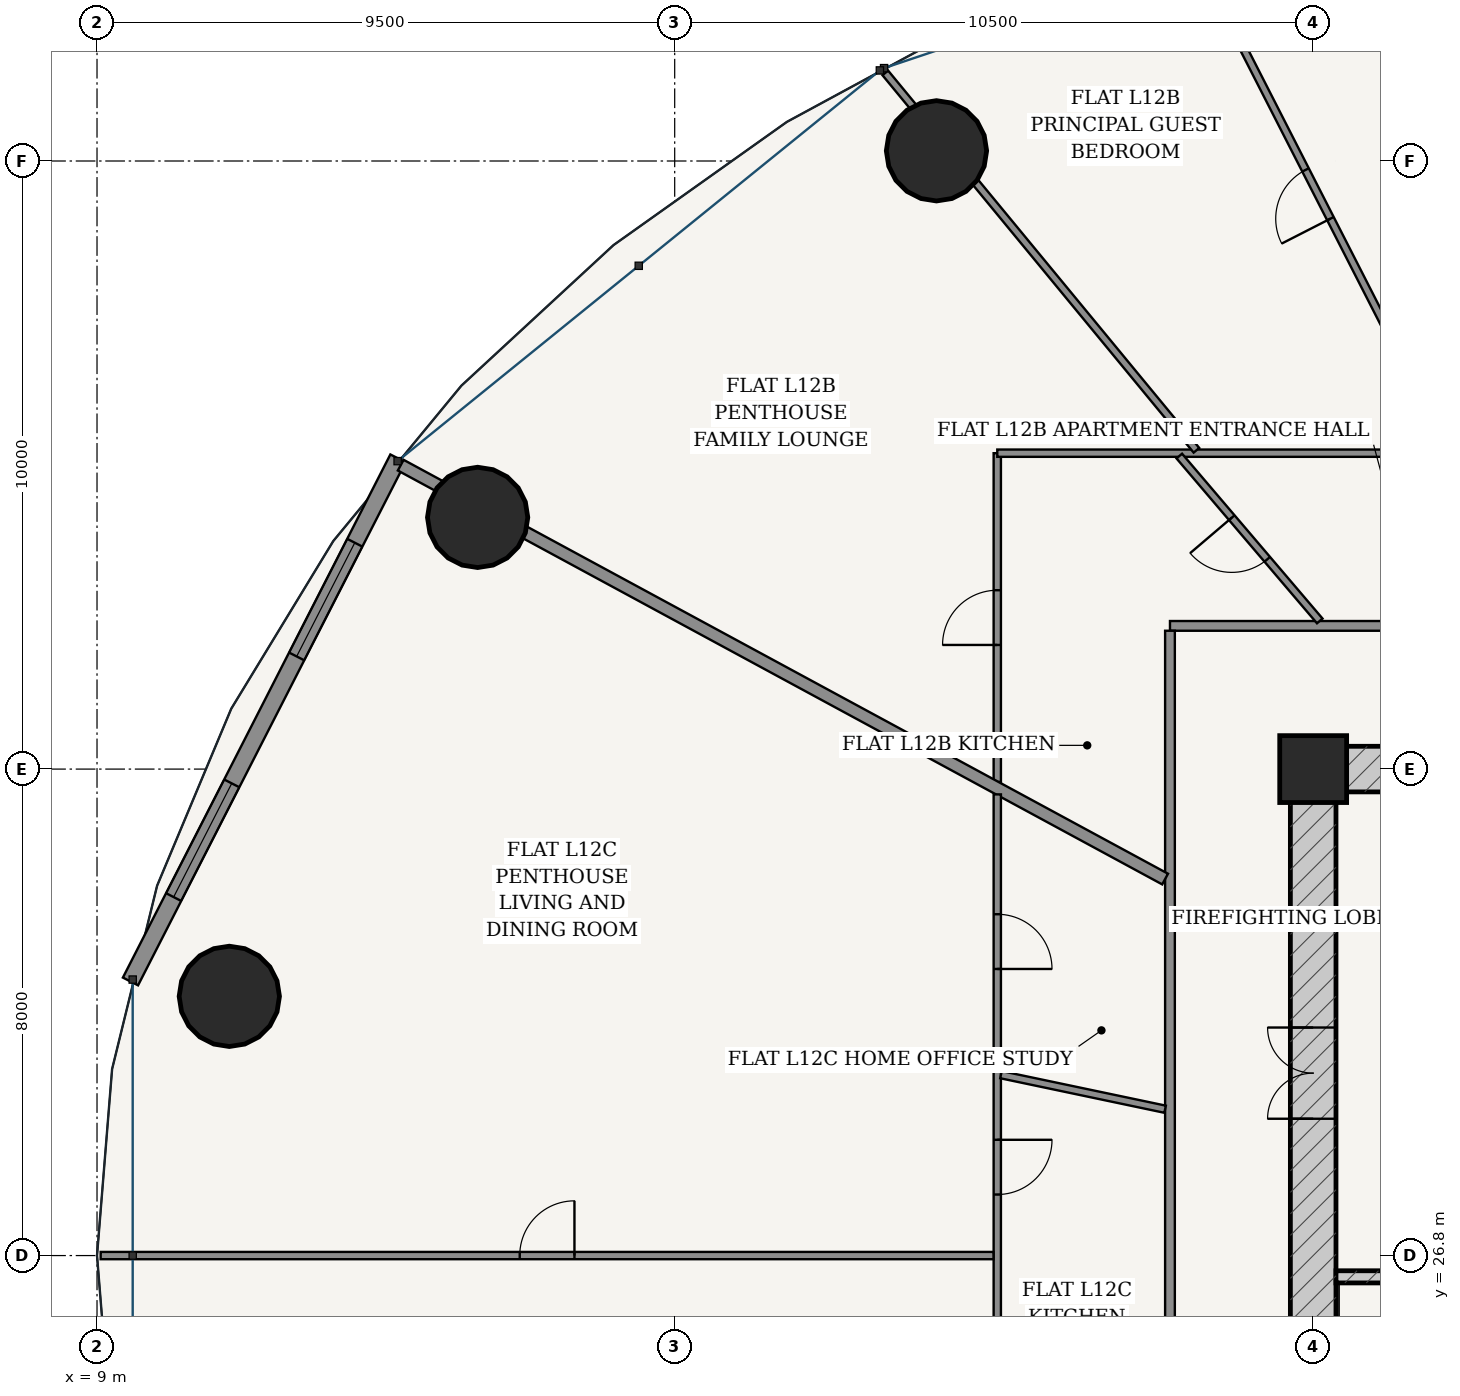
"""IFC4 building model, lengths in metres.
Left out: names, types, materials, properties, quantities, classifications, styles, units other than length and angle.
Written with IfcOpenShell. Run it as: python <this file> out.ifc"""

import sys

from ifc_helpers import new_model, si_unit, direction, frame, frame_2d, origin, origin_2d, place, context, subcontext, project, spatial, rectangle, hollow_circle, extrude, source, transform, mapped, element, fill, save


model = new_model("IFC4")
c1 = context("Model", 3, precision=1e-05, world=origin(), true_north=direction((-0.2419218956, 0.970295726276)))
c2 = subcontext(c1, "Body", "Model", "MODEL_VIEW")
j1 = project(units=[si_unit("LENGTHUNIT", "METRE"), si_unit("PLANEANGLEUNIT", "RADIAN")], contexts=[c1])
p1 = place(None, origin())
s1 = spatial("IfcSite", under=j1, at=p1, CompositionType="ELEMENT")
p2 = place(p1, origin())
s2 = spatial("IfcBuilding", under=s1, at=p2, CompositionType="ELEMENT")
p3 = place(p2, frame((0.0, 0.0, 49.2)))
s3 = spatial("IfcBuildingStorey", under=s2, at=p3, CompositionType="ELEMENT", Elevation=49.2)
p4 = place(p3, frame((29.0, 34.8, 0.0), z_axis=(0.0, 0.0, 1.0), x_axis=(1.0, 0.0, 0.0)))
e1 = element("IfcColumn", 1, at=p4, inside=s3, PredefinedType="COLUMN", context=c2, shape_type="SweptSolid", body=[
    extrude(rectangle(XDim=1.1, YDim=1.1, at=origin_2d()), origin(), (0.0, 0.0, 1.0), 3.6),
])
p5 = place(p3, frame((28.625, 34.8, 0.0), z_axis=(0.0, 0.0, 1.0), x_axis=(1.0, 0.0, 0.0)))
e2 = element("IfcWall", 2, at=p5, inside=s3, PredefinedType="SHEAR", context=c2, shape_type="SweptSolid", body=[
    extrude(rectangle(XDim=18.75, YDim=0.75, at=frame_2d((9.375, 0.0))), origin(), (0.0, 0.0, 1.0), 3.32),
])
p6 = place(p5, frame((6.887, 0.0, 0.0)))
e3 = element("IfcOpeningElement", 3, at=p6, cuts=e2, PredefinedType="OPENING", context=c2, shape_type="SweptSolid", body=[
    extrude(rectangle(XDim=0.85, YDim=2.1, at=frame_2d((0.425, 1.05))), frame((0.0, 0.385, 0.0), z_axis=(0.0, -1.0, 0.0), x_axis=(1.0, 0.0, 0.0)), (0.0, 0.0, 1.0), 0.77),
])
p7 = place(p5, frame((8.945, 0.0, 0.0)))
e4 = element("IfcOpeningElement", 4, at=p7, cuts=e2, PredefinedType="OPENING", context=c2, shape_type="SweptSolid", body=[
    extrude(rectangle(XDim=0.86, YDim=2.1, at=frame_2d((0.43, 1.05))), frame((0.0, 0.385, 0.0), z_axis=(0.0, -1.0, 0.0), x_axis=(1.0, 0.0, 0.0)), (0.0, 0.0, 1.0), 0.77),
])
p8 = place(p5, frame((11.012, 0.0, 0.0)))
e5 = element("IfcOpeningElement", 5, at=p8, cuts=e2, PredefinedType="OPENING", context=c2, shape_type="SweptSolid", body=[
    extrude(rectangle(XDim=0.85, YDim=2.1, at=frame_2d((0.425, 1.05))), frame((0.0, 0.385, 0.0), z_axis=(0.0, -1.0, 0.0), x_axis=(1.0, 0.0, 0.0)), (0.0, 0.0, 1.0), 0.77),
])
p9 = place(p3, frame((29.0, 19.175, 0.0), z_axis=(0.0, 0.0, 1.0), x_axis=(0.0, 1.0, 0.0)))
e6 = element("IfcWall", 6, at=p9, inside=s3, PredefinedType="SHEAR", context=c2, shape_type="SweptSolid", body=[
    extrude(rectangle(XDim=15.25, YDim=0.75, at=frame_2d((7.625, 0.0))), origin(), (0.0, 0.0, 1.0), 3.32),
])
p10 = place(p9, frame((9.875, 0.0, 0.0)))
e7 = element("IfcOpeningElement", 7, at=p10, cuts=e6, PredefinedType="OPENING", context=c2, shape_type="SweptSolid", body=[
    extrude(rectangle(XDim=1.5, YDim=2.2, at=frame_2d((0.75, 1.1))), frame((0.0, 0.385, 0.0), z_axis=(0.0, -1.0, 0.0), x_axis=(1.0, 0.0, 0.0)), (0.0, 0.0, 1.0), 0.77),
])
p11 = place(p3, frame((29.375, 26.45, 0.0), z_axis=(0.0, 0.0, 1.0), x_axis=(1.0, 0.0, 0.0)))
e8 = element("IfcWall", 8, at=p11, inside=s3, PredefinedType="SOLIDWALL", context=c2, shape_type="SweptSolid", body=[
    extrude(rectangle(XDim=3.32, YDim=0.2, at=frame_2d((1.66, 0.0))), origin(), (0.0, 0.0, 1.0), 3.32),
])
p12 = place(p11, frame((1.185, 0.0, 0.0)))
e9 = element("IfcOpeningElement", 9, at=p12, cuts=e8, PredefinedType="OPENING", context=c2, shape_type="SweptSolid", body=[
    extrude(rectangle(XDim=0.95, YDim=2.15, at=frame_2d((0.475, 1.075))), frame((0.0, 0.11, 0.0), z_axis=(0.0, -1.0, 0.0), x_axis=(1.0, 0.0, 0.0)), (0.0, 0.0, 1.0), 0.22),
])
for number, where, z_axis, x_axis in (
    (10, (22.805, 44.968, 0.0), (0.0, 0.0, 1.0), (1.0, 0.0, 0.0)),
    (11, (15.259, 38.939, 0.0), (0.0, 0.0, 1.0), (1.0, 0.0, 0.0)),
    (12, (11.176, 31.063, 0.0), (0.0, 0.0, 1.0), (1.0, 0.0, 0.0)),
):
    element("IfcColumn", number, at=place(p3, frame(where, z_axis=z_axis, x_axis=x_axis)), inside=s3, PredefinedType="COLUMN", context=c2, shape_type="SweptSolid", body=[
        extrude(hollow_circle(Radius=0.825, WallThickness=0.05, at=origin_2d()), origin(), (0.0, 0.0, 1.0), 3.6),
    ])
p13 = place(p3, frame((13.949, 39.91, 0.0), z_axis=(0.0, 0.0, 1.0), x_axis=(-0.45523081716, -0.890373462715, 0.0)))
e13 = element("IfcWall", 13, at=p13, inside=s3, PredefinedType="SOLIDWALL", context=c2, shape_type="SweptSolid", body=[
    extrude(rectangle(XDim=9.662, YDim=0.28, at=frame_2d((4.831, 0.0))), origin(), (0.0, 0.0, 1.0), 3.32),
])
p14 = place(p13, frame((1.559, 0.0, 0.85)))
e14 = element("IfcOpeningElement", 14, at=p14, cuts=e13, PredefinedType="OPENING", context=c2, shape_type="SweptSolid", body=[
    extrude(rectangle(XDim=2.1, YDim=1.95, at=frame_2d((1.05, 0.975))), frame((0.0, 0.15, 0.0), z_axis=(0.0, -1.0, 0.0), x_axis=(1.0, 0.0, 0.0)), (0.0, 0.0, 1.0), 0.3),
])
p15 = place(p13, frame((6.003, 0.0, 0.85)))
e15 = element("IfcOpeningElement", 15, at=p15, cuts=e13, PredefinedType="OPENING", context=c2, shape_type="SweptSolid", body=[
    extrude(rectangle(XDim=2.1, YDim=1.95, at=frame_2d((1.05, 0.975))), frame((0.0, 0.15, 0.0), z_axis=(0.0, -1.0, 0.0), x_axis=(1.0, 0.0, 0.0)), (0.0, 0.0, 1.0), 0.3),
])
p16 = place(p3, frame((26.645, 37.155, 0.0), z_axis=(0.0, 0.0, 1.0), x_axis=(1.0, 0.0, 0.0)))
e16 = element("IfcWall", 16, at=p16, inside=s3, PredefinedType="PARTITIONING", context=c2, shape_type="SweptSolid", body=[
    extrude(rectangle(XDim=22.71, YDim=0.16, at=frame_2d((11.355, 0.0))), origin(), (0.0, 0.0, 1.0), 2.688),
])
p17 = place(p16, frame((19.075, 0.0, 0.0)))
e17 = element("IfcOpeningElement", 17, at=p17, cuts=e16, PredefinedType="OPENING", context=c2, shape_type="SweptSolid", body=[
    extrude(rectangle(XDim=0.98, YDim=2.2, at=frame_2d((0.49, 1.1))), frame((0.0, 0.09, 0.0), z_axis=(0.0, -1.0, 0.0), x_axis=(1.0, 0.0, 0.0)), (0.0, 0.0, 1.0), 0.18),
])
p18 = place(p16, frame((6.221, 0.0, 0.0)))
e18 = element("IfcOpeningElement", 18, at=p18, cuts=e16, PredefinedType="OPENING", context=c2, shape_type="SweptSolid", body=[
    extrude(rectangle(XDim=0.98, YDim=2.2, at=frame_2d((0.49, 1.1))), frame((0.0, 0.09, 0.0), z_axis=(0.0, -1.0, 0.0), x_axis=(1.0, 0.0, 0.0)), (0.0, 0.0, 1.0), 0.18),
])
p19 = place(p3, frame((26.645, 16.525, 0.0), z_axis=(0.0, 0.0, 1.0), x_axis=(0.0, 1.0, 0.0)))
e19 = element("IfcWall", 19, at=p19, inside=s3, PredefinedType="PARTITIONING", context=c2, shape_type="SweptSolid", body=[
    extrude(rectangle(XDim=20.55, YDim=0.16, at=frame_2d((10.275, 0.0))), origin(), (0.0, 0.0, 1.0), 2.688),
])
p20 = place(p19, frame((2.224, 0.0, 0.0)))
e20 = element("IfcOpeningElement", 20, at=p20, cuts=e19, PredefinedType="OPENING", context=c2, shape_type="SweptSolid", body=[
    extrude(rectangle(XDim=0.98, YDim=2.2, at=frame_2d((0.49, 1.1))), frame((0.0, 0.09, 0.0), z_axis=(0.0, -1.0, 0.0), x_axis=(1.0, 0.0, 0.0)), (0.0, 0.0, 1.0), 0.18),
])
p21 = place(p3, frame((23.805, 34.588, 0.0), z_axis=(0.0, 0.0, 1.0), x_axis=(0.0, 1.0, 0.0)))
e21 = element("IfcWall", 21, at=p21, inside=s3, PredefinedType="PARTITIONING", context=c2, shape_type="SweptSolid", body=[
    extrude(rectangle(XDim=5.407, YDim=0.12, at=frame_2d((2.704, 0.0))), origin(), (0.0, 0.0, 1.0), 2.999),
])
p22 = place(p21, frame((2.253, 0.0, 0.0)))
e22 = element("IfcOpeningElement", 22, at=p22, cuts=e21, PredefinedType="OPENING", context=c2, shape_type="SweptSolid", body=[
    extrude(rectangle(XDim=0.9, YDim=2.15, at=frame_2d((0.45, 1.075))), frame((0.0, 0.07, 0.0), z_axis=(0.0, -1.0, 0.0), x_axis=(1.0, 0.0, 0.0)), (0.0, 0.0, 1.0), 0.14),
])
p23 = place(p3, frame((23.805, 39.995, 0.0), z_axis=(0.0, 0.0, 1.0), x_axis=(1.0, 0.0, 0.0)))
e23 = element("IfcWall", 23, at=p23, inside=s3, PredefinedType="PARTITIONING", context=c2, shape_type="SweptSolid", body=[
    extrude(rectangle(XDim=20.838, YDim=0.12, at=frame_2d((10.419, 0.0))), origin(), (0.0, 0.0, 1.0), 2.688),
])
p24 = place(p23, frame((11.931, 0.0, 0.0)))
e24 = element("IfcOpeningElement", 24, at=p24, cuts=e23, PredefinedType="OPENING", context=c2, shape_type="SweptSolid", body=[
    extrude(rectangle(XDim=0.9, YDim=2.15, at=frame_2d((0.45, 1.075))), frame((0.0, 0.07, 0.0), z_axis=(0.0, -1.0, 0.0), x_axis=(1.0, 0.0, 0.0)), (0.0, 0.0, 1.0), 0.14),
])
p25 = place(p3, frame((31.227, 40.05, 0.0), z_axis=(0.0, 0.0, 1.0), x_axis=(-0.455142050367, 0.890418841887, 0.0)))
e25 = element("IfcWall", 25, at=p25, inside=s3, PredefinedType="PARTITIONING", context=c2, shape_type="SweptSolid", body=[
    extrude(rectangle(XDim=9.438, YDim=0.12, at=frame_2d((4.719, 0.0))), origin(), (0.0, 0.0, 1.0), 2.762),
])
p26 = place(p25, frame((4.269, 0.0, 0.0)))
e26 = element("IfcOpeningElement", 26, at=p26, cuts=e25, PredefinedType="OPENING", context=c2, shape_type="SweptSolid", body=[
    extrude(rectangle(XDim=0.9, YDim=2.15, at=frame_2d((0.45, 1.075))), frame((0.0, 0.07, 0.0), z_axis=(0.0, -1.0, 0.0), x_axis=(1.0, 0.0, 0.0)), (0.0, 0.0, 1.0), 0.14),
])
p27 = place(p3, frame((27.081, 40.043, 0.0), z_axis=(0.0, 0.0, 1.0), x_axis=(-0.636193310573, 0.771529695852, 0.0)))
e27 = element("IfcWall", 27, at=p27, inside=s3, PredefinedType="PARTITIONING", context=c2, shape_type="SweptSolid", body=[
    extrude(rectangle(XDim=8.044, YDim=0.12, at=frame_2d((4.022, 0.0))), origin(), (0.0, 0.0, 1.0), 2.688),
])
p28 = place(p3, frame((29.108, 37.237, 0.0), z_axis=(0.0, 0.0, 1.0), x_axis=(-0.648553247009, 0.761169288526, 0.0)))
e28 = element("IfcWall", 28, at=p28, inside=s3, PredefinedType="PARTITIONING", context=c2, shape_type="SweptSolid", body=[
    extrude(rectangle(XDim=3.562, YDim=0.12, at=frame_2d((1.781, 0.0))), origin(), (0.0, 0.0, 1.0), 2.999),
])
p29 = place(p28, frame((1.331, 0.0, 0.0)))
e29 = element("IfcOpeningElement", 29, at=p29, cuts=e28, PredefinedType="OPENING", context=c2, shape_type="SweptSolid", body=[
    extrude(rectangle(XDim=0.9, YDim=2.15, at=frame_2d((0.45, 1.075))), frame((0.0, 0.07, 0.0), z_axis=(0.0, -1.0, 0.0), x_axis=(1.0, 0.0, 0.0)), (0.0, 0.0, 1.0), 0.14),
])
p30 = place(p3, frame((26.565, 32.991, 0.0), z_axis=(0.0, 0.0, 1.0), x_axis=(-0.879369737803, 0.476139542819, 0.0)))
e30 = element("IfcWall", 30, at=p30, inside=s3, PredefinedType="PARTITIONING", context=c2, shape_type="SweptSolid", body=[
    extrude(rectangle(XDim=14.295, YDim=0.2, at=frame_2d((7.147, 0.0))), origin(), (0.0, 0.0, 1.0), 2.688),
])
p31 = place(p3, frame((23.805, 13.605, 0.0), z_axis=(0.0, 0.0, 1.0), x_axis=(0.0, 1.0, 0.0)))
e31 = element("IfcWall", 31, at=p31, inside=s3, PredefinedType="PARTITIONING", context=c2, shape_type="SweptSolid", body=[
    extrude(rectangle(XDim=20.779, YDim=0.12, at=frame_2d((10.39, 0.0))), origin(), (0.0, 0.0, 1.0), 2.688),
])
p32 = place(p31, frame((2.425, 0.0, 0.0)))
e32 = element("IfcOpeningElement", 32, at=p32, cuts=e31, PredefinedType="OPENING", context=c2, shape_type="SweptSolid", body=[
    extrude(rectangle(XDim=0.9, YDim=2.15, at=frame_2d((0.45, 1.075))), frame((0.0, 0.07, 0.0), z_axis=(0.0, -1.0, 0.0), x_axis=(1.0, 0.0, 0.0)), (0.0, 0.0, 1.0), 0.14),
])
p33 = place(p31, frame((14.199, 0.0, 0.0)))
e33 = element("IfcOpeningElement", 33, at=p33, cuts=e31, PredefinedType="OPENING", context=c2, shape_type="SweptSolid", body=[
    extrude(rectangle(XDim=0.9, YDim=2.15, at=frame_2d((0.45, 1.075))), frame((0.0, 0.07, 0.0), z_axis=(0.0, -1.0, 0.0), x_axis=(1.0, 0.0, 0.0)), (0.0, 0.0, 1.0), 0.14),
])
p34 = place(p31, frame((17.908, 0.0, 0.0)))
e34 = element("IfcOpeningElement", 34, at=p34, cuts=e31, PredefinedType="OPENING", context=c2, shape_type="SweptSolid", body=[
    extrude(rectangle(XDim=0.9, YDim=2.15, at=frame_2d((0.45, 1.075))), frame((0.0, 0.07, 0.0), z_axis=(0.0, -1.0, 0.0), x_axis=(1.0, 0.0, 0.0)), (0.0, 0.0, 1.0), 0.14),
])
p35 = place(p3, frame((23.743, 26.8, 0.0), z_axis=(0.0, 0.0, 1.0), x_axis=(-1.0, 0.0, 0.0)))
e35 = element("IfcWall", 35, at=p35, inside=s3, PredefinedType="PARTITIONING", context=c2, shape_type="SweptSolid", body=[
    extrude(rectangle(XDim=14.683, YDim=0.12, at=frame_2d((7.341, 0.0))), origin(), (0.0, 0.0, 1.0), 2.762),
])
p36 = place(p35, frame((6.892, 0.0, 0.0)))
e36 = element("IfcOpeningElement", 36, at=p36, cuts=e35, PredefinedType="OPENING", context=c2, shape_type="SweptSolid", body=[
    extrude(rectangle(XDim=0.9, YDim=2.15, at=frame_2d((0.45, 1.075))), frame((0.0, 0.07, 0.0), z_axis=(0.0, -1.0, 0.0), x_axis=(1.0, 0.0, 0.0)), (0.0, 0.0, 1.0), 0.14),
])
p37 = place(p3, frame((26.565, 29.207, 0.0), z_axis=(0.0, 0.0, 1.0), x_axis=(-0.978560113768, 0.205961413236, 0.0)))
e37 = element("IfcWall", 37, at=p37, inside=s3, PredefinedType="PARTITIONING", context=c2, shape_type="SweptSolid", body=[
    extrude(rectangle(XDim=2.758, YDim=0.12, at=frame_2d((1.379, 0.0))), origin(), (0.0, 0.0, 1.0), 3.32),
])
m1 = source(origin(), c2, "Body", "SweptSolid", [
    extrude(rectangle(XDim=2.1, YDim=1.95, at=frame_2d((1.05, 0.975))), frame((0.0, 0.03, 0.0), z_axis=(0.0, -1.0, 0.0), x_axis=(1.0, 0.0, 0.0)), (0.0, 0.0, 1.0), 0.06),
])
p38 = place(p14, origin())
e38 = element("IfcWindow", 38, at=p38, inside=s3, PartitioningType="SINGLE_PANEL", PredefinedType="WINDOW", context=c2, shape_type="MappedRepresentation", body=[
    mapped(m1, transform((0.0, 0.0, 0.0), scale=1.0)),
])
fill(e14, e38)
p39 = place(p15, origin())
e39 = element("IfcWindow", 39, at=p39, inside=s3, PartitioningType="SINGLE_PANEL", PredefinedType="WINDOW", context=c2, shape_type="MappedRepresentation", body=[
    mapped(m1, transform((0.0, 0.0, 0.0), scale=1.0)),
])
fill(e15, e39)
m2 = source(origin(), c2, "Body", "SweptSolid", [
    extrude(rectangle(XDim=1.5, YDim=2.2, at=frame_2d((0.75, 1.1))), frame((0.0, 0.025, 0.0), z_axis=(0.0, -1.0, 0.0), x_axis=(1.0, 0.0, 0.0)), (0.0, 0.0, 1.0), 0.05),
])
p40 = place(p10, origin())
e40 = element("IfcDoor", 40, at=p40, inside=s3, OperationType="DOUBLE_DOOR_SINGLE_SWING", PredefinedType="DOOR", context=c2, shape_type="MappedRepresentation", body=[
    mapped(m2, transform((0.0, 0.0, 0.0), scale=1.0)),
])
fill(e7, e40)
m3 = source(origin(), c2, "Body", "SweptSolid", [
    extrude(rectangle(XDim=0.9, YDim=2.15, at=frame_2d((0.45, 1.075))), frame((0.0, 0.025, 0.0), z_axis=(0.0, -1.0, 0.0), x_axis=(1.0, 0.0, 0.0)), (0.0, 0.0, 1.0), 0.05),
])
p41 = place(p29, origin())
e41 = element("IfcDoor", 41, at=p41, inside=s3, OperationType="SINGLE_SWING_RIGHT", PredefinedType="DOOR", context=c2, shape_type="MappedRepresentation", body=[
    mapped(m3, transform((0.0, 0.0, 0.0), scale=1.0)),
])
fill(e29, e41)
p42 = place(p22, origin())
e42 = element("IfcDoor", 42, at=p42, inside=s3, OperationType="SINGLE_SWING_LEFT", PredefinedType="DOOR", context=c2, shape_type="MappedRepresentation", body=[
    mapped(m3, transform((0.0, 0.0, 0.0), scale=1.0)),
])
fill(e22, e42)
p43 = place(p26, origin())
e43 = element("IfcDoor", 43, at=p43, inside=s3, OperationType="SINGLE_SWING_LEFT", PredefinedType="DOOR", context=c2, shape_type="MappedRepresentation", body=[
    mapped(m3, transform((0.0, 0.0, 0.0), scale=1.0)),
])
fill(e26, e43)
p44 = place(p36, frame((0.9, 0.0, 0.0), z_axis=(0.0, 0.0, 1.0), x_axis=(-1.0, 0.0, 0.0)))
e44 = element("IfcDoor", 44, at=p44, inside=s3, OperationType="SINGLE_SWING_RIGHT", PredefinedType="DOOR", context=c2, shape_type="MappedRepresentation", body=[
    mapped(m3, transform((0.0, 0.0, 0.0), scale=1.0)),
])
fill(e36, e44)
p45 = place(p33, frame((0.9, 0.0, 0.0), z_axis=(0.0, 0.0, 1.0), x_axis=(-1.0, 0.0, 0.0)))
e45 = element("IfcDoor", 45, at=p45, inside=s3, OperationType="SINGLE_SWING_LEFT", PredefinedType="DOOR", context=c2, shape_type="MappedRepresentation", body=[
    mapped(m3, transform((0.0, 0.0, 0.0), scale=1.0)),
])
fill(e33, e45)
p46 = place(p34, frame((0.9, 0.0, 0.0), z_axis=(0.0, 0.0, 1.0), x_axis=(-1.0, 0.0, 0.0)))
e46 = element("IfcDoor", 46, at=p46, inside=s3, OperationType="SINGLE_SWING_RIGHT", PredefinedType="DOOR", context=c2, shape_type="MappedRepresentation", body=[
    mapped(m3, transform((0.0, 0.0, 0.0), scale=1.0)),
])
fill(e34, e46)
save(model, sys.argv[1])
